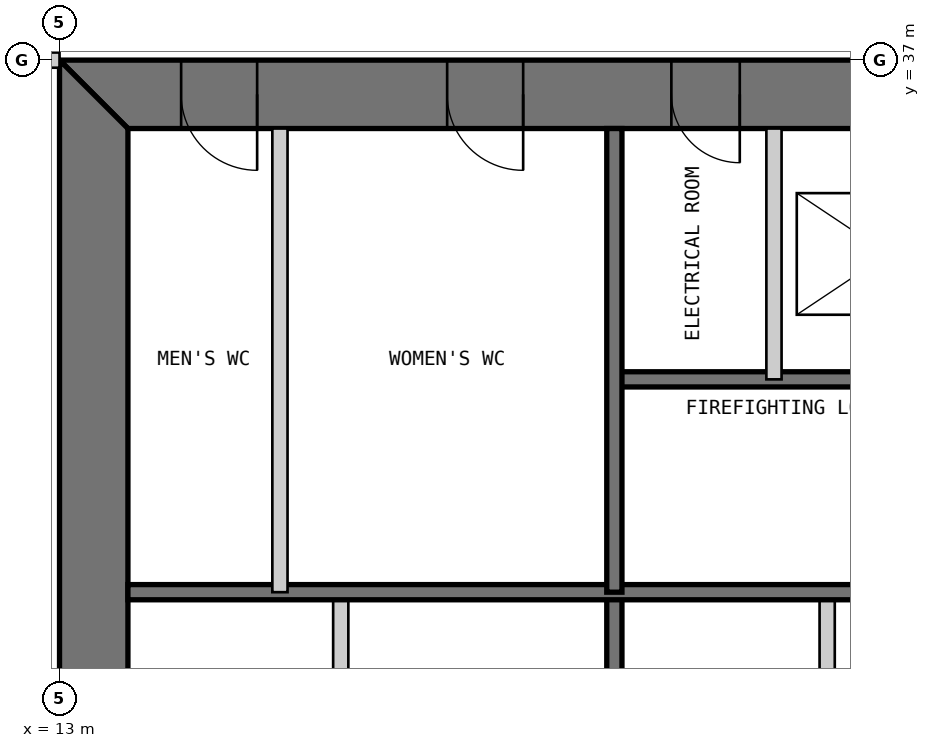
"""IFC4 building model, lengths in metres.
Left out: names, types, materials, properties, quantities, classifications, styles, units other than length and angle.
Written with IfcOpenShell. Run it as: python <this file> out.ifc"""

import sys

from ifc_helpers import new_model, si_unit, direction, frame, frame_2d, origin, place, context, subcontext, project, spatial, polyline, rectangle, outline, extrude, element, fill, save


model = new_model("IFC4")
c1 = context("Model", 3, precision=1e-05, world=origin(), true_north=direction((0.0, 1.0)))
c2 = subcontext(c1, "Body", "Model", "MODEL_VIEW")
j1 = project(units=[si_unit("LENGTHUNIT", "METRE"), si_unit("PLANEANGLEUNIT", "RADIAN")], contexts=[c1])
p1 = place(None, origin())
s1 = spatial("IfcSite", under=j1, at=p1, CompositionType="ELEMENT")
p2 = place(p1, origin())
s2 = spatial("IfcBuilding", under=s1, at=p2, CompositionType="ELEMENT")
p3 = place(p2, frame((0.0, 0.0, 16.6)))
s3 = spatial("IfcBuildingStorey", under=s2, at=p3, CompositionType="ELEMENT", Elevation=16.6)
p4 = place(p3, frame((37.0, 36.55, 0.0), z_axis=(0.0, 0.0, 1.0), x_axis=(-1.0, 0.0, 0.0)))
e1 = element("IfcWall", 1, at=p4, inside=s3, PredefinedType="SHEAR", context=c2, shape_type="SweptSolid", body=[
    extrude(outline(polyline([(0.0, -0.45), (24.0, -0.45), (23.1, 0.45), (0.9, 0.45), (0.0, -0.45)])), origin(), (0.0, 0.0, 1.0), 4.8),
])
p5 = place(p4, frame((4.9, 0.0, 0.0)))
e2 = element("IfcOpeningElement", 2, at=p5, cuts=e1, PredefinedType="OPENING", context=c2, shape_type="SweptSolid", body=[
    extrude(rectangle(XDim=1.0, YDim=2.2, at=frame_2d((0.5, 1.1))), frame((0.0, 0.46, 0.0), z_axis=(0.0, -1.0, 0.0), x_axis=(1.0, 0.0, 0.0)), (0.0, 0.0, 1.0), 0.92),
])
p6 = place(p4, frame((8.9, 0.0, 0.0)))
e3 = element("IfcOpeningElement", 3, at=p6, cuts=e1, PredefinedType="OPENING", context=c2, shape_type="SweptSolid", body=[
    extrude(rectangle(XDim=1.1, YDim=2.2, at=frame_2d((0.55, 1.1))), frame((0.0, 0.46, 0.0), z_axis=(0.0, -1.0, 0.0), x_axis=(1.0, 0.0, 0.0)), (0.0, 0.0, 1.0), 0.92),
])
p7 = place(p4, frame((15.05, 0.0, 0.0)))
e4 = element("IfcOpeningElement", 4, at=p7, cuts=e1, PredefinedType="OPENING", context=c2, shape_type="SweptSolid", body=[
    extrude(rectangle(XDim=0.9, YDim=2.2, at=frame_2d((0.45, 1.1))), frame((0.0, 0.46, 0.0), z_axis=(0.0, -1.0, 0.0), x_axis=(1.0, 0.0, 0.0)), (0.0, 0.0, 1.0), 0.92),
])
p8 = place(p4, frame((17.9, 0.0, 0.0)))
e5 = element("IfcOpeningElement", 5, at=p8, cuts=e1, PredefinedType="OPENING", context=c2, shape_type="SweptSolid", body=[
    extrude(rectangle(XDim=1.0, YDim=2.2, at=frame_2d((0.5, 1.1))), frame((0.0, 0.46, 0.0), z_axis=(0.0, -1.0, 0.0), x_axis=(1.0, 0.0, 0.0)), (0.0, 0.0, 1.0), 0.92),
])
p9 = place(p4, frame((21.4, 0.0, 0.0)))
e6 = element("IfcOpeningElement", 6, at=p9, cuts=e1, PredefinedType="OPENING", context=c2, shape_type="SweptSolid", body=[
    extrude(rectangle(XDim=1.0, YDim=2.2, at=frame_2d((0.5, 1.1))), frame((0.0, 0.46, 0.0), z_axis=(0.0, -1.0, 0.0), x_axis=(1.0, 0.0, 0.0)), (0.0, 0.0, 1.0), 0.92),
])
p10 = place(p3, frame((13.45, 36.1, 0.0), z_axis=(0.0, 0.0, 1.0), x_axis=(0.0, -1.0, 0.0)))
e7 = element("IfcWall", 7, at=p10, inside=s3, PredefinedType="SHEAR", context=c2, shape_type="SweptSolid", body=[
    extrude(outline(polyline([(-0.9, -0.45), (23.1, -0.45), (22.2, 0.45), (0.0, 0.45), (-0.9, -0.45)])), origin(), (0.0, 0.0, 1.0), 4.8),
])
p11 = place(p10, frame((20.2, 0.0, 0.0)))
e8 = element("IfcOpeningElement", 8, at=p11, cuts=e7, PredefinedType="OPENING", context=c2, shape_type="SweptSolid", body=[
    extrude(rectangle(XDim=1.0, YDim=2.2, at=frame_2d((0.5, 1.1))), frame((0.0, 0.46, 0.0), z_axis=(0.0, -1.0, 0.0), x_axis=(1.0, 0.0, 0.0)), (0.0, 0.0, 1.0), 0.92),
])
p12 = place(p10, frame((17.25, 0.0, 0.0)))
e9 = element("IfcOpeningElement", 9, at=p12, cuts=e7, PredefinedType="OPENING", context=c2, shape_type="SweptSolid", body=[
    extrude(rectangle(XDim=0.9, YDim=2.2, at=frame_2d((0.45, 1.1))), frame((0.0, 0.46, 0.0), z_axis=(0.0, -1.0, 0.0), x_axis=(1.0, 0.0, 0.0)), (0.0, 0.0, 1.0), 0.92),
])
p13 = place(p3, frame((16.7, 13.9, 0.0), z_axis=(0.0, 0.0, 1.0), x_axis=(0.0, 1.0, 0.0)))
e10 = element("IfcWall", 10, at=p13, inside=s3, PredefinedType="PARTITIONING", context=c2, shape_type="SweptSolid", body=[
    extrude(rectangle(XDim=16.1, YDim=0.2, at=frame_2d((8.05, 0.0))), origin(), (0.0, 0.0, 1.0), 4.6),
])
p14 = place(p3, frame((20.3, 13.9, 0.0), z_axis=(0.0, 0.0, 1.0), x_axis=(0.0, 1.0, 0.0)))
e11 = element("IfcWall", 11, at=p14, inside=s3, PredefinedType="SOLIDWALL", context=c2, shape_type="SweptSolid", body=[
    extrude(rectangle(XDim=16.1, YDim=0.2, at=frame_2d((8.05, 0.0))), origin(), (0.0, 0.0, 1.0), 4.6),
])
p15 = place(p3, frame((23.1, 20.0, 0.0), z_axis=(0.0, 0.0, 1.0), x_axis=(0.0, 1.0, 0.0)))
e12 = element("IfcWall", 12, at=p15, inside=s3, PredefinedType="PARTITIONING", context=c2, shape_type="SweptSolid", body=[
    extrude(rectangle(XDim=10.0, YDim=0.2, at=frame_2d((5.0, 0.0))), origin(), (0.0, 0.0, 1.0), 4.6),
])
p16 = place(p3, frame((29.7, 32.8, 0.0), z_axis=(0.0, 0.0, 1.0), x_axis=(-1.0, 0.0, 0.0)))
e13 = element("IfcWall", 13, at=p16, inside=s3, PredefinedType="SOLIDWALL", context=c2, shape_type="SweptSolid", body=[
    extrude(rectangle(XDim=9.4, YDim=0.2, at=frame_2d((4.7, 0.0))), origin(), (0.0, 0.0, 1.0), 4.6),
])
p17 = place(p16, frame((0.25, 0.0, 0.0)))
e14 = element("IfcOpeningElement", 14, at=p17, cuts=e13, PredefinedType="OPENING", context=c2, shape_type="SweptSolid", body=[
    extrude(rectangle(XDim=1.0, YDim=2.2, at=frame_2d((0.5, 1.1))), frame((0.0, 0.11, 0.0), z_axis=(0.0, -1.0, 0.0), x_axis=(1.0, 0.0, 0.0)), (0.0, 0.0, 1.0), 0.22),
])
p18 = place(p3, frame((29.7, 30.0, 0.0), z_axis=(0.0, 0.0, 1.0), x_axis=(-1.0, 0.0, 0.0)))
e15 = element("IfcWall", 15, at=p18, inside=s3, PredefinedType="SOLIDWALL", context=c2, shape_type="SweptSolid", body=[
    extrude(rectangle(XDim=15.8, YDim=0.2, at=frame_2d((7.9, 0.0))), origin(), (0.0, 0.0, 1.0), 4.6),
])
p19 = place(p3, frame((22.4, 36.1, 0.0), z_axis=(0.0, 0.0, 1.0), x_axis=(0.0, -1.0, 0.0)))
e16 = element("IfcWall", 16, at=p19, inside=s3, PredefinedType="PARTITIONING", context=c2, shape_type="SweptSolid", body=[
    extrude(rectangle(XDim=3.3, YDim=0.2, at=frame_2d((1.65, 0.0))), origin(), (0.0, 0.0, 1.0), 4.6),
])
p20 = place(p3, frame((20.3, 36.1, 0.0), z_axis=(0.0, 0.0, 1.0), x_axis=(0.0, -1.0, 0.0)))
e17 = element("IfcWall", 17, at=p20, inside=s3, PredefinedType="SOLIDWALL", context=c2, shape_type="SweptSolid", body=[
    extrude(rectangle(XDim=6.1, YDim=0.2, at=frame_2d((3.05, 0.0))), origin(), (0.0, 0.0, 1.0), 4.6),
])
p21 = place(p3, frame((15.9, 36.1, 0.0), z_axis=(0.0, 0.0, 1.0), x_axis=(0.0, -1.0, 0.0)))
e18 = element("IfcWall", 18, at=p21, inside=s3, PredefinedType="PARTITIONING", context=c2, shape_type="SweptSolid", body=[
    extrude(rectangle(XDim=6.1, YDim=0.2, at=frame_2d((3.05, 0.0))), origin(), (0.0, 0.0, 1.0), 4.6),
])
p22 = place(p3, frame((7.0, 37.0, 0.0), z_axis=(0.0, 0.0, 1.0), x_axis=(1.0, 0.0, 0.0)))
e19 = element("IfcWall", 19, at=p22, inside=s3, PredefinedType="PARTITIONING", context=c2, shape_type="SweptSolid", body=[
    extrude(rectangle(XDim=6.0, YDim=0.2, at=frame_2d((3.0, 0.0))), origin(), (0.0, 0.0, 1.0), 3.653),
])
p23 = place(p7, origin())
e20 = element("IfcDoor", 20, at=p23, inside=s3, OperationType="SINGLE_SWING_LEFT", PredefinedType="DOOR", context=c2, shape_type="SweptSolid", body=[
    extrude(rectangle(XDim=0.9, YDim=2.2, at=frame_2d((0.45, 1.1))), frame((0.0, 0.025, 0.0), z_axis=(0.0, -1.0, 0.0), x_axis=(1.0, 0.0, 0.0)), (0.0, 0.0, 1.0), 0.05),
    extrude(outline(polyline([(0.0, 0.0), (0.04, 0.0), (0.04, 2.16), (0.86, 2.16), (0.86, 0.0), (0.9, 0.0), (0.9, 2.2), (0.0, 2.2), (0.0, 0.0)])), frame((0.0, 0.3, 0.0), z_axis=(0.0, -1.0, 0.0), x_axis=(1.0, 0.0, 0.0)), (0.0, 0.0, 1.0), 0.6),
])
fill(e4, e20)
p24 = place(p8, origin())
e21 = element("IfcDoor", 21, at=p24, inside=s3, OperationType="SINGLE_SWING_LEFT", PredefinedType="DOOR", context=c2, shape_type="SweptSolid", body=[
    extrude(rectangle(XDim=1.0, YDim=2.2, at=frame_2d((0.5, 1.1))), frame((0.0, 0.025, 0.0), z_axis=(0.0, -1.0, 0.0), x_axis=(1.0, 0.0, 0.0)), (0.0, 0.0, 1.0), 0.05),
    extrude(outline(polyline([(0.0, 0.0), (0.04, 0.0), (0.04, 2.16), (0.96, 2.16), (0.96, 0.0), (1.0, 0.0), (1.0, 2.2), (0.0, 2.2), (0.0, 0.0)])), frame((0.0, 0.3, 0.0), z_axis=(0.0, -1.0, 0.0), x_axis=(1.0, 0.0, 0.0)), (0.0, 0.0, 1.0), 0.6),
])
fill(e5, e21)
p25 = place(p9, origin())
e22 = element("IfcDoor", 22, at=p25, inside=s3, OperationType="SINGLE_SWING_LEFT", PredefinedType="DOOR", context=c2, shape_type="SweptSolid", body=[
    extrude(rectangle(XDim=1.0, YDim=2.2, at=frame_2d((0.5, 1.1))), frame((0.0, 0.025, 0.0), z_axis=(0.0, -1.0, 0.0), x_axis=(1.0, 0.0, 0.0)), (0.0, 0.0, 1.0), 0.05),
    extrude(outline(polyline([(0.0, 0.0), (0.04, 0.0), (0.04, 2.16), (0.96, 2.16), (0.96, 0.0), (1.0, 0.0), (1.0, 2.2), (0.0, 2.2), (0.0, 0.0)])), frame((0.0, 0.3, 0.0), z_axis=(0.0, -1.0, 0.0), x_axis=(1.0, 0.0, 0.0)), (0.0, 0.0, 1.0), 0.6),
])
fill(e6, e22)
save(model, sys.argv[1])
